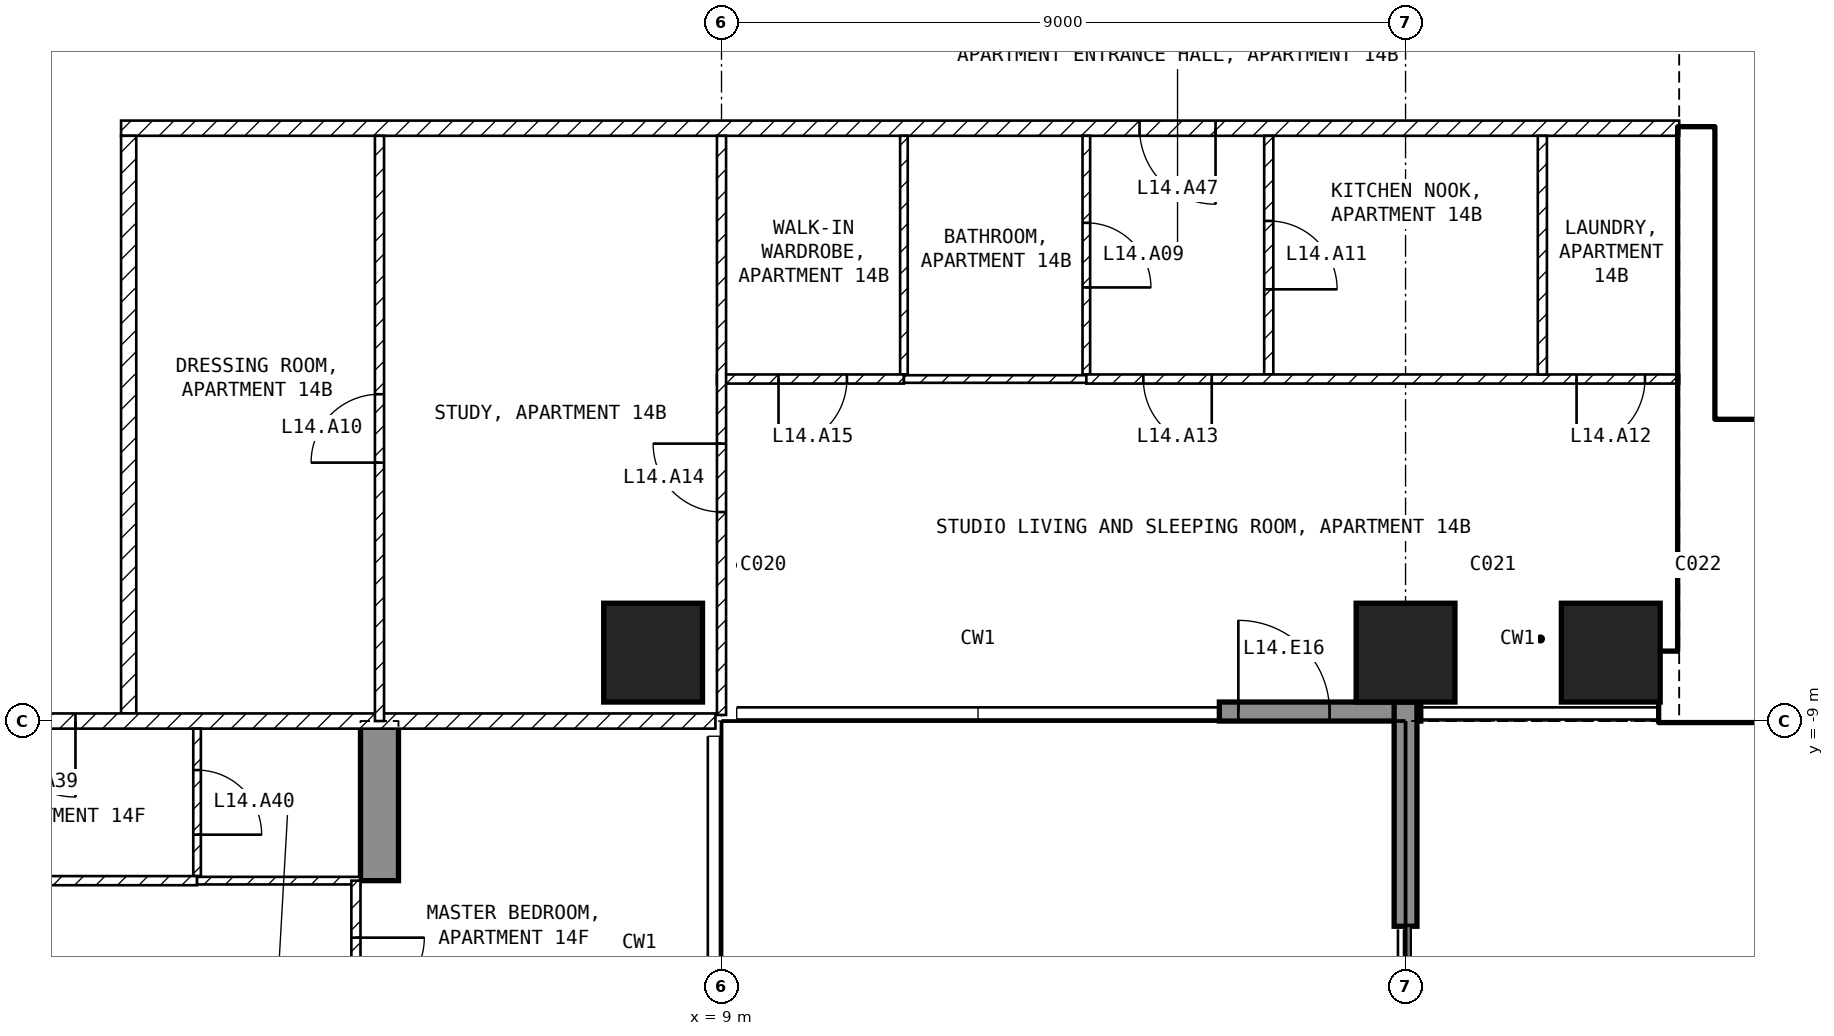
"""IFC4 building model, lengths in metres.
Left out: names, types, materials, properties, quantities, classifications, styles, units other than length and angle.
Written with IfcOpenShell. Run it as: python <this file> out.ifc"""

import sys

from ifc_helpers import new_model, si_unit, direction, frame, frame_2d, origin, origin_2d, place, context, subcontext, project, spatial, polyline, rectangle, outline, extrude, element, fill, save


model = new_model("IFC4")
c1 = context("Model", 3, precision=1e-05, world=origin(), true_north=direction((0.0, 1.0)))
c2 = subcontext(c1, "Body", "Model", "MODEL_VIEW")
j1 = project(units=[si_unit("LENGTHUNIT", "METRE"), si_unit("PLANEANGLEUNIT", "RADIAN")], contexts=[c1])
p1 = place(None, origin())
s1 = spatial("IfcSite", under=j1, at=p1, CompositionType="ELEMENT")
p2 = place(p1, origin())
s2 = spatial("IfcBuilding", under=s1, at=p2, CompositionType="ELEMENT")
p3 = place(p2, frame((0.0, 0.0, 68.0)))
s3 = spatial("IfcBuildingStorey", under=s2, at=p3, CompositionType="ELEMENT", Elevation=68.0)
for number, where, z_axis, x_axis in (
    (1, (8.1, -8.1, -0.25), (0.0, 0.0, 1.0), (1.0, 0.0, 0.0)),
    (2, (18.0, -8.1, -0.25), (0.0, 0.0, 1.0), (1.0, 0.0, 0.0)),
    (3, (20.7, -8.1, -0.25), (0.0, 0.0, 1.0), (1.0, 0.0, 0.0)),
):
    element("IfcColumn", number, at=place(p3, frame(where, z_axis=z_axis, x_axis=x_axis)), inside=s3, PredefinedType="COLUMN", context=c2, shape_type="SweptSolid", body=[
        extrude(rectangle(XDim=1.3, YDim=1.3, at=origin_2d()), origin(), (0.0, 0.0, 1.0), 3.5),
    ])
p4 = place(p3, frame((4.25, -25.45, -0.25), z_axis=(1.0, 0.0, 0.0), x_axis=(0.0, 1.0, 0.0)))
e4 = element("IfcWall", 4, at=p4, inside=s3, PredefinedType="SHEAR", context=c2, shape_type="SweptSolid", body=[
    extrude(outline(polyline([(0.0, 0.0), (4.15, 0.0), (4.15, 2.65), (6.55, 2.65), (6.55, 0.0), (11.95, 0.0), (11.95, 2.65), (14.35, 2.65), (14.35, 0.0), (16.45, 0.0), (16.45, 3.5), (0.0, 3.5), (0.0, 0.0)])), origin(), (0.0, 0.0, 1.0), 0.5),
])
p5 = place(p3, frame((15.55, -8.875, 0.0), z_axis=(0.0, 0.0, 1.0), x_axis=(1.0, 0.0, 0.0)))
e5 = element("IfcWall", 5, at=p5, inside=s3, PredefinedType="SOLIDWALL", context=c2, shape_type="SweptSolid", body=[
    extrude(rectangle(XDim=2.65, YDim=0.25, at=frame_2d((1.325, 0.0))), origin(), (0.0, 0.0, 1.0), 3.25),
])
p6 = place(p5, frame((0.25, 0.0, 0.0)))
e6 = element("IfcOpeningElement", 6, at=p6, cuts=e5, PredefinedType="OPENING", context=c2, shape_type="SweptSolid", body=[
    extrude(rectangle(XDim=1.2, YDim=2.4, at=frame_2d((0.6, 1.2))), frame((0.0, 0.135, 0.0), z_axis=(0.0, -1.0, 0.0), x_axis=(1.0, 0.0, 0.0)), (0.0, 0.0, 1.0), 0.27),
])
p7 = place(p3, frame((18.0, -8.75, 0.0), z_axis=(0.0, 0.0, 1.0), x_axis=(0.0, -1.0, 0.0)))
e7 = element("IfcWall", 7, at=p7, inside=s3, PredefinedType="SOLIDWALL", context=c2, shape_type="SweptSolid", body=[
    extrude(rectangle(XDim=2.95, YDim=0.3, at=frame_2d((1.475, 0.0))), origin(), (0.0, 0.0, 1.0), 3.25),
])
p8 = place(p3, frame((21.35, -8.55, 0.0), z_axis=(0.0, 0.0, 1.0), x_axis=(1.0, 0.0, 0.0)))
e8 = element("IfcWall", 8, at=p8, inside=s3, PredefinedType="SHEAR", context=c2, shape_type="SweptSolid", body=[
    extrude(rectangle(XDim=11.05, YDim=0.9, at=frame_2d((5.525, 0.0))), origin(), (0.0, 0.0, 1.0), 3.25),
])
p9 = place(p3, frame((21.825, -8.1, 0.0), z_axis=(0.0, 0.0, 1.0), x_axis=(0.0, 1.0, 0.0)))
e9 = element("IfcWall", 9, at=p9, inside=s3, PredefinedType="SHEAR", context=c2, shape_type="SweptSolid", body=[
    extrude(rectangle(XDim=6.9, YDim=0.45, at=frame_2d((3.45, 0.0))), origin(), (0.0, 0.0, 1.0), 3.25),
])
p10 = place(p3, frame((22.05, -5.15, 0.0), z_axis=(0.0, 0.0, 1.0), x_axis=(1.0, 0.0, 0.0)))
e10 = element("IfcWall", 10, at=p10, inside=s3, PredefinedType="SOLIDWALL", context=c2, shape_type="SweptSolid", body=[
    extrude(rectangle(XDim=6.3, YDim=0.2, at=frame_2d((3.15, 0.0))), origin(), (0.0, 0.0, 1.0), 3.25),
])
p11 = place(p10, frame((0.2, 0.0, 0.0)))
e11 = element("IfcOpeningElement", 11, at=p11, cuts=e10, PredefinedType="OPENING", context=c2, shape_type="SweptSolid", body=[
    extrude(rectangle(XDim=1.0, YDim=2.1, at=frame_2d((0.5, 1.05))), frame((0.0, 0.11, 0.0), z_axis=(0.0, -1.0, 0.0), x_axis=(1.0, 0.0, 0.0)), (0.0, 0.0, 1.0), 0.22),
])
p12 = place(p3, frame((21.6, -1.2, 0.0), z_axis=(0.0, 0.0, 1.0), x_axis=(-1.0, 0.0, 0.0)))
e12 = element("IfcWall", 12, at=p12, inside=s3, PredefinedType="PARTITIONING", context=c2, shape_type="SweptSolid", body=[
    extrude(rectangle(XDim=20.5, YDim=0.2, at=frame_2d((10.25, 0.0))), origin(), (0.0, 0.0, 1.0), 3.25),
])
p13 = place(p12, frame((6.1, 0.0, 0.0)))
e13 = element("IfcOpeningElement", 13, at=p13, cuts=e12, PredefinedType="OPENING", context=c2, shape_type="SweptSolid", body=[
    extrude(rectangle(XDim=1.0, YDim=2.1, at=frame_2d((0.5, 1.05))), frame((0.0, 0.11, 0.0), z_axis=(0.0, -1.0, 0.0), x_axis=(1.0, 0.0, 0.0)), (0.0, 0.0, 1.0), 0.22),
])
p14 = place(p3, frame((1.2, -1.3, 0.0), z_axis=(0.0, 0.0, 1.0), x_axis=(0.0, -1.0, 0.0)))
e14 = element("IfcWall", 14, at=p14, inside=s3, PredefinedType="PARTITIONING", context=c2, shape_type="SweptSolid", body=[
    extrude(rectangle(XDim=7.6, YDim=0.2, at=frame_2d((3.8, 0.0))), origin(), (0.0, 0.0, 1.0), 3.25),
])
p15 = place(p3, frame((8.92, -9.0, 0.0), z_axis=(0.0, 0.0, 1.0), x_axis=(-1.0, 0.0, 0.0)))
e15 = element("IfcWall", 15, at=p15, inside=s3, PredefinedType="PARTITIONING", context=c2, shape_type="SweptSolid", body=[
    extrude(rectangle(XDim=17.84, YDim=0.2, at=frame_2d((8.92, 0.0))), origin(), (0.0, 0.0, 1.0), 3.25),
])
p16 = place(p15, frame((8.42, 0.0, 0.0)))
e16 = element("IfcOpeningElement", 16, at=p16, cuts=e15, PredefinedType="OPENING", context=c2, shape_type="SweptSolid", body=[
    extrude(rectangle(XDim=1.0, YDim=2.1, at=frame_2d((0.5, 1.05))), frame((0.0, 0.11, 0.0), z_axis=(0.0, -1.0, 0.0), x_axis=(1.0, 0.0, 0.0)), (0.0, 0.0, 1.0), 0.22),
])
p17 = place(p3, frame((11.4, -1.3, 0.0), z_axis=(0.0, 0.0, 1.0), x_axis=(0.0, -1.0, 0.0)))
e17 = element("IfcWall", 17, at=p17, inside=s3, PredefinedType="PARTITIONING", context=c2, shape_type="SweptSolid", body=[
    extrude(rectangle(XDim=3.14, YDim=0.1, at=frame_2d((1.57, 0.0))), origin(), (0.0, 0.0, 1.0), 3.25),
])
p18 = place(p3, frame((11.4, -4.5, 0.0), z_axis=(0.0, 0.0, 1.0), x_axis=(-1.0, 0.0, 0.0)))
e18 = element("IfcWall", 18, at=p18, inside=s3, PredefinedType="PARTITIONING", context=c2, shape_type="SweptSolid", body=[
    extrude(rectangle(XDim=2.46, YDim=0.12, at=frame_2d((1.23, 0.0))), origin(), (0.0, 0.0, 1.0), 3.25),
])
p19 = place(p18, frame((0.75, 0.0, 0.0)))
e19 = element("IfcOpeningElement", 19, at=p19, cuts=e18, PredefinedType="OPENING", context=c2, shape_type="SweptSolid", body=[
    extrude(rectangle(XDim=0.9, YDim=2.1, at=frame_2d((0.45, 1.05))), frame((0.0, 0.07, 0.0), z_axis=(0.0, -1.0, 0.0), x_axis=(1.0, 0.0, 0.0)), (0.0, 0.0, 1.0), 0.14),
])
p20 = place(p3, frame((9.0, -8.92, 0.0), z_axis=(0.0, 0.0, 1.0), x_axis=(0.0, 1.0, 0.0)))
e20 = element("IfcWall", 20, at=p20, inside=s3, PredefinedType="PARTITIONING", context=c2, shape_type="SweptSolid", body=[
    extrude(rectangle(XDim=7.62, YDim=0.12, at=frame_2d((3.81, 0.0))), origin(), (0.0, 0.0, 1.0), 3.25),
])
p21 = place(p20, frame((2.67, 0.0, 0.0)))
e21 = element("IfcOpeningElement", 21, at=p21, cuts=e20, PredefinedType="OPENING", context=c2, shape_type="SweptSolid", body=[
    extrude(rectangle(XDim=0.9, YDim=2.1, at=frame_2d((0.45, 1.05))), frame((0.0, 0.07, 0.0), z_axis=(0.0, -1.0, 0.0), x_axis=(1.0, 0.0, 0.0)), (0.0, 0.0, 1.0), 0.14),
])
p22 = place(p3, frame((13.8, -1.3, 0.0), z_axis=(0.0, 0.0, 1.0), x_axis=(0.0, -1.0, 0.0)))
e22 = element("IfcWall", 22, at=p22, inside=s3, PredefinedType="PARTITIONING", context=c2, shape_type="SweptSolid", body=[
    extrude(rectangle(XDim=3.14, YDim=0.1, at=frame_2d((1.57, 0.0))), origin(), (0.0, 0.0, 1.0), 3.25),
])
p23 = place(p22, frame((1.145, 0.0, 0.0)))
e23 = element("IfcOpeningElement", 23, at=p23, cuts=e22, PredefinedType="OPENING", context=c2, shape_type="SweptSolid", body=[
    extrude(rectangle(XDim=0.85, YDim=2.1, at=frame_2d((0.425, 1.05))), frame((0.0, 0.06, 0.0), z_axis=(0.0, -1.0, 0.0), x_axis=(1.0, 0.0, 0.0)), (0.0, 0.0, 1.0), 0.12),
])
p24 = place(p3, frame((13.8, -4.5, 0.0), z_axis=(0.0, 0.0, 1.0), x_axis=(-1.0, 0.0, 0.0)))
e24 = element("IfcWall", 24, at=p24, inside=s3, PredefinedType="PARTITIONING", context=c2, shape_type="SweptSolid", body=[
    extrude(rectangle(XDim=2.4, YDim=0.1, at=frame_2d((1.2, 0.0))), origin(), (0.0, 0.0, 1.0), 3.25),
])
p25 = place(p3, frame((16.2, -1.3, 0.0), z_axis=(0.0, 0.0, 1.0), x_axis=(0.0, -1.0, 0.0)))
e25 = element("IfcWall", 25, at=p25, inside=s3, PredefinedType="PARTITIONING", context=c2, shape_type="SweptSolid", body=[
    extrude(rectangle(XDim=3.14, YDim=0.12, at=frame_2d((1.57, 0.0))), origin(), (0.0, 0.0, 1.0), 3.25),
])
p26 = place(p25, frame((1.12, 0.0, 0.0)))
e26 = element("IfcOpeningElement", 26, at=p26, cuts=e25, PredefinedType="OPENING", context=c2, shape_type="SweptSolid", body=[
    extrude(rectangle(XDim=0.9, YDim=2.1, at=frame_2d((0.45, 1.05))), frame((0.0, 0.07, 0.0), z_axis=(0.0, -1.0, 0.0), x_axis=(1.0, 0.0, 0.0)), (0.0, 0.0, 1.0), 0.14),
])
p27 = place(p3, frame((21.6, -4.5, 0.0), z_axis=(0.0, 0.0, 1.0), x_axis=(-1.0, 0.0, 0.0)))
e27 = element("IfcWall", 27, at=p27, inside=s3, PredefinedType="PARTITIONING", context=c2, shape_type="SweptSolid", body=[
    extrude(rectangle(XDim=7.8, YDim=0.12, at=frame_2d((3.9, 0.0))), origin(), (0.0, 0.0, 1.0), 3.25),
])
p28 = place(p27, frame((0.45, 0.0, 0.0)))
e28 = element("IfcOpeningElement", 28, at=p28, cuts=e27, PredefinedType="OPENING", context=c2, shape_type="SweptSolid", body=[
    extrude(rectangle(XDim=0.9, YDim=2.1, at=frame_2d((0.45, 1.05))), frame((0.0, 0.07, 0.0), z_axis=(0.0, -1.0, 0.0), x_axis=(1.0, 0.0, 0.0)), (0.0, 0.0, 1.0), 0.14),
])
p29 = place(p27, frame((6.15, 0.0, 0.0)))
e29 = element("IfcOpeningElement", 29, at=p29, cuts=e27, PredefinedType="OPENING", context=c2, shape_type="SweptSolid", body=[
    extrude(rectangle(XDim=0.9, YDim=2.1, at=frame_2d((0.45, 1.05))), frame((0.0, 0.07, 0.0), z_axis=(0.0, -1.0, 0.0), x_axis=(1.0, 0.0, 0.0)), (0.0, 0.0, 1.0), 0.14),
])
p30 = place(p3, frame((19.8, -1.3, 0.0), z_axis=(0.0, 0.0, 1.0), x_axis=(0.0, -1.0, 0.0)))
e30 = element("IfcWall", 30, at=p30, inside=s3, PredefinedType="PARTITIONING", context=c2, shape_type="SweptSolid", body=[
    extrude(rectangle(XDim=3.14, YDim=0.12, at=frame_2d((1.57, 0.0))), origin(), (0.0, 0.0, 1.0), 3.25),
])
p31 = place(p3, frame((4.5, -9.0, 0.0), z_axis=(0.0, 0.0, 1.0), x_axis=(0.0, 1.0, 0.0)))
e31 = element("IfcWall", 31, at=p31, inside=s3, PredefinedType="PARTITIONING", context=c2, shape_type="SweptSolid", body=[
    extrude(rectangle(XDim=7.7, YDim=0.12, at=frame_2d((3.85, 0.0))), origin(), (0.0, 0.0, 1.0), 3.25),
])
p32 = place(p31, frame((3.4, 0.0, 0.0)))
e32 = element("IfcOpeningElement", 32, at=p32, cuts=e31, PredefinedType="OPENING", context=c2, shape_type="SweptSolid", body=[
    extrude(rectangle(XDim=0.9, YDim=2.1, at=frame_2d((0.45, 1.05))), frame((0.0, 0.07, 0.0), z_axis=(0.0, -1.0, 0.0), x_axis=(1.0, 0.0, 0.0)), (0.0, 0.0, 1.0), 0.14),
])
p33 = place(p3, frame((2.1, -9.1, 0.0), z_axis=(0.0, 0.0, 1.0), x_axis=(0.0, -1.0, 0.0)))
e33 = element("IfcWall", 33, at=p33, inside=s3, PredefinedType="PARTITIONING", context=c2, shape_type="SweptSolid", body=[
    extrude(rectangle(XDim=1.94, YDim=0.1, at=frame_2d((0.97, 0.0))), origin(), (0.0, 0.0, 1.0), 3.25),
])
p34 = place(p33, frame((0.545, 0.0, 0.0)))
e34 = element("IfcOpeningElement", 34, at=p34, cuts=e33, PredefinedType="OPENING", context=c2, shape_type="SweptSolid", body=[
    extrude(rectangle(XDim=0.85, YDim=2.1, at=frame_2d((0.425, 1.05))), frame((0.0, 0.06, 0.0), z_axis=(0.0, -1.0, 0.0), x_axis=(1.0, 0.0, 0.0)), (0.0, 0.0, 1.0), 0.12),
])
p35 = place(p3, frame((2.1, -11.1, 0.0), z_axis=(0.0, 0.0, 1.0), x_axis=(-1.0, 0.0, 0.0)))
e35 = element("IfcWall", 35, at=p35, inside=s3, PredefinedType="PARTITIONING", context=c2, shape_type="SweptSolid", body=[
    extrude(rectangle(XDim=6.35, YDim=0.12, at=frame_2d((3.175, 0.0))), origin(), (0.0, 0.0, 1.0), 3.25),
])
p36 = place(p35, frame((2.725, 0.0, 0.0)))
e36 = element("IfcOpeningElement", 36, at=p36, cuts=e35, PredefinedType="OPENING", context=c2, shape_type="SweptSolid", body=[
    extrude(rectangle(XDim=0.9, YDim=2.1, at=frame_2d((0.45, 1.05))), frame((0.0, 0.07, 0.0), z_axis=(0.0, -1.0, 0.0), x_axis=(1.0, 0.0, 0.0)), (0.0, 0.0, 1.0), 0.14),
])
p37 = place(p3, frame((4.25, -11.1, 0.0), z_axis=(0.0, 0.0, 1.0), x_axis=(-1.0, 0.0, 0.0)))
e37 = element("IfcWall", 37, at=p37, inside=s3, PredefinedType="PARTITIONING", context=c2, shape_type="SweptSolid", body=[
    extrude(rectangle(XDim=2.15, YDim=0.1, at=frame_2d((1.075, 0.0))), origin(), (0.0, 0.0, 1.0), 3.25),
])
p38 = place(p3, frame((4.19, -11.1, 0.0), z_axis=(0.0, 0.0, 1.0), x_axis=(0.0, -1.0, 0.0)))
e38 = element("IfcWall", 38, at=p38, inside=s3, PredefinedType="PARTITIONING", context=c2, shape_type="SweptSolid", body=[
    extrude(rectangle(XDim=2.4, YDim=0.12, at=frame_2d((1.2, 0.0))), origin(), (0.0, 0.0, 1.0), 2.4),
])
p39 = place(p38, frame((0.75, 0.0, 0.0)))
e39 = element("IfcOpeningElement", 39, at=p39, cuts=e38, PredefinedType="OPENING", context=c2, shape_type="SweptSolid", body=[
    extrude(rectangle(XDim=0.9, YDim=2.1, at=frame_2d((0.45, 1.05))), frame((0.0, 0.07, 0.0), z_axis=(0.0, -1.0, 0.0), x_axis=(1.0, 0.0, 0.0)), (0.0, 0.0, 1.0), 0.14),
])
p40 = place(p6, origin())
e40 = element("IfcDoor", 40, at=p40, inside=s3, OperationType="SINGLE_SWING_LEFT", PredefinedType="DOOR", context=c2, shape_type="SweptSolid", body=[
    extrude(rectangle(XDim=1.2, YDim=2.4, at=frame_2d((0.6, 1.2))), frame((0.0, 0.025, 0.0), z_axis=(0.0, -1.0, 0.0), x_axis=(1.0, 0.0, 0.0)), (0.0, 0.0, 1.0), 0.05),
])
fill(e6, e40)
p41 = place(p11, origin())
e41 = element("IfcDoor", 41, at=p41, inside=s3, OperationType="SINGLE_SWING_LEFT", PredefinedType="DOOR", context=c2, shape_type="SweptSolid", body=[
    extrude(rectangle(XDim=1.0, YDim=2.1, at=frame_2d((0.5, 1.05))), frame((0.0, 0.025, 0.0), z_axis=(0.0, -1.0, 0.0), x_axis=(1.0, 0.0, 0.0)), (0.0, 0.0, 1.0), 0.05),
])
fill(e11, e41)
p42 = place(p23, origin())
e42 = element("IfcDoor", 42, at=p42, inside=s3, OperationType="SINGLE_SWING_RIGHT", PredefinedType="DOOR", context=c2, shape_type="SweptSolid", body=[
    extrude(rectangle(XDim=0.85, YDim=2.1, at=frame_2d((0.425, 1.05))), frame((0.0, 0.025, 0.0), z_axis=(0.0, -1.0, 0.0), x_axis=(1.0, 0.0, 0.0)), (0.0, 0.0, 1.0), 0.05),
])
fill(e23, e42)
p43 = place(p32, origin())
e43 = element("IfcDoor", 43, at=p43, inside=s3, OperationType="SINGLE_SWING_LEFT", PredefinedType="DOOR", context=c2, shape_type="SweptSolid", body=[
    extrude(rectangle(XDim=0.9, YDim=2.1, at=frame_2d((0.45, 1.05))), frame((0.0, 0.025, 0.0), z_axis=(0.0, -1.0, 0.0), x_axis=(1.0, 0.0, 0.0)), (0.0, 0.0, 1.0), 0.05),
])
fill(e32, e43)
p44 = place(p26, origin())
e44 = element("IfcDoor", 44, at=p44, inside=s3, OperationType="SINGLE_SWING_RIGHT", PredefinedType="DOOR", context=c2, shape_type="SweptSolid", body=[
    extrude(rectangle(XDim=0.9, YDim=2.1, at=frame_2d((0.45, 1.05))), frame((0.0, 0.025, 0.0), z_axis=(0.0, -1.0, 0.0), x_axis=(1.0, 0.0, 0.0)), (0.0, 0.0, 1.0), 0.05),
])
fill(e26, e44)
p45 = place(p28, origin())
e45 = element("IfcDoor", 45, at=p45, inside=s3, OperationType="SINGLE_SWING_RIGHT", PredefinedType="DOOR", context=c2, shape_type="SweptSolid", body=[
    extrude(rectangle(XDim=0.9, YDim=2.1, at=frame_2d((0.45, 1.05))), frame((0.0, 0.025, 0.0), z_axis=(0.0, -1.0, 0.0), x_axis=(1.0, 0.0, 0.0)), (0.0, 0.0, 1.0), 0.05),
])
fill(e28, e45)
p46 = place(p29, origin())
e46 = element("IfcDoor", 46, at=p46, inside=s3, OperationType="SINGLE_SWING_LEFT", PredefinedType="DOOR", context=c2, shape_type="SweptSolid", body=[
    extrude(rectangle(XDim=0.9, YDim=2.1, at=frame_2d((0.45, 1.05))), frame((0.0, 0.025, 0.0), z_axis=(0.0, -1.0, 0.0), x_axis=(1.0, 0.0, 0.0)), (0.0, 0.0, 1.0), 0.05),
])
fill(e29, e46)
p47 = place(p21, origin())
e47 = element("IfcDoor", 47, at=p47, inside=s3, OperationType="SINGLE_SWING_RIGHT", PredefinedType="DOOR", context=c2, shape_type="SweptSolid", body=[
    extrude(rectangle(XDim=0.9, YDim=2.1, at=frame_2d((0.45, 1.05))), frame((0.0, 0.025, 0.0), z_axis=(0.0, -1.0, 0.0), x_axis=(1.0, 0.0, 0.0)), (0.0, 0.0, 1.0), 0.05),
])
fill(e21, e47)
p48 = place(p19, origin())
e48 = element("IfcDoor", 48, at=p48, inside=s3, OperationType="SINGLE_SWING_RIGHT", PredefinedType="DOOR", context=c2, shape_type="SweptSolid", body=[
    extrude(rectangle(XDim=0.9, YDim=2.1, at=frame_2d((0.45, 1.05))), frame((0.0, 0.025, 0.0), z_axis=(0.0, -1.0, 0.0), x_axis=(1.0, 0.0, 0.0)), (0.0, 0.0, 1.0), 0.05),
])
fill(e19, e48)
p49 = place(p16, origin())
e49 = element("IfcDoor", 49, at=p49, inside=s3, OperationType="SINGLE_SWING_LEFT", PredefinedType="DOOR", context=c2, shape_type="SweptSolid", body=[
    extrude(rectangle(XDim=1.0, YDim=2.1, at=frame_2d((0.5, 1.05))), frame((0.0, 0.025, 0.0), z_axis=(0.0, -1.0, 0.0), x_axis=(1.0, 0.0, 0.0)), (0.0, 0.0, 1.0), 0.05),
])
fill(e16, e49)
p50 = place(p34, origin())
e50 = element("IfcDoor", 50, at=p50, inside=s3, OperationType="SINGLE_SWING_RIGHT", PredefinedType="DOOR", context=c2, shape_type="SweptSolid", body=[
    extrude(rectangle(XDim=0.85, YDim=2.1, at=frame_2d((0.425, 1.05))), frame((0.0, 0.025, 0.0), z_axis=(0.0, -1.0, 0.0), x_axis=(1.0, 0.0, 0.0)), (0.0, 0.0, 1.0), 0.05),
])
fill(e34, e50)
p51 = place(p13, origin())
e51 = element("IfcDoor", 51, at=p51, inside=s3, OperationType="SINGLE_SWING_LEFT", PredefinedType="DOOR", context=c2, shape_type="SweptSolid", body=[
    extrude(rectangle(XDim=1.0, YDim=2.1, at=frame_2d((0.5, 1.05))), frame((0.0, 0.025, 0.0), z_axis=(0.0, -1.0, 0.0), x_axis=(1.0, 0.0, 0.0)), (0.0, 0.0, 1.0), 0.05),
])
fill(e13, e51)
p52 = place(p39, origin())
e52 = element("IfcDoor", 52, at=p52, inside=s3, OperationType="SINGLE_SWING_LEFT", PredefinedType="DOOR", context=c2, shape_type="SweptSolid", body=[
    extrude(rectangle(XDim=0.9, YDim=2.1, at=frame_2d((0.45, 1.05))), frame((0.0, 0.025, 0.0), z_axis=(0.0, -1.0, 0.0), x_axis=(1.0, 0.0, 0.0)), (0.0, 0.0, 1.0), 0.05),
])
fill(e39, e52)
save(model, sys.argv[1])
